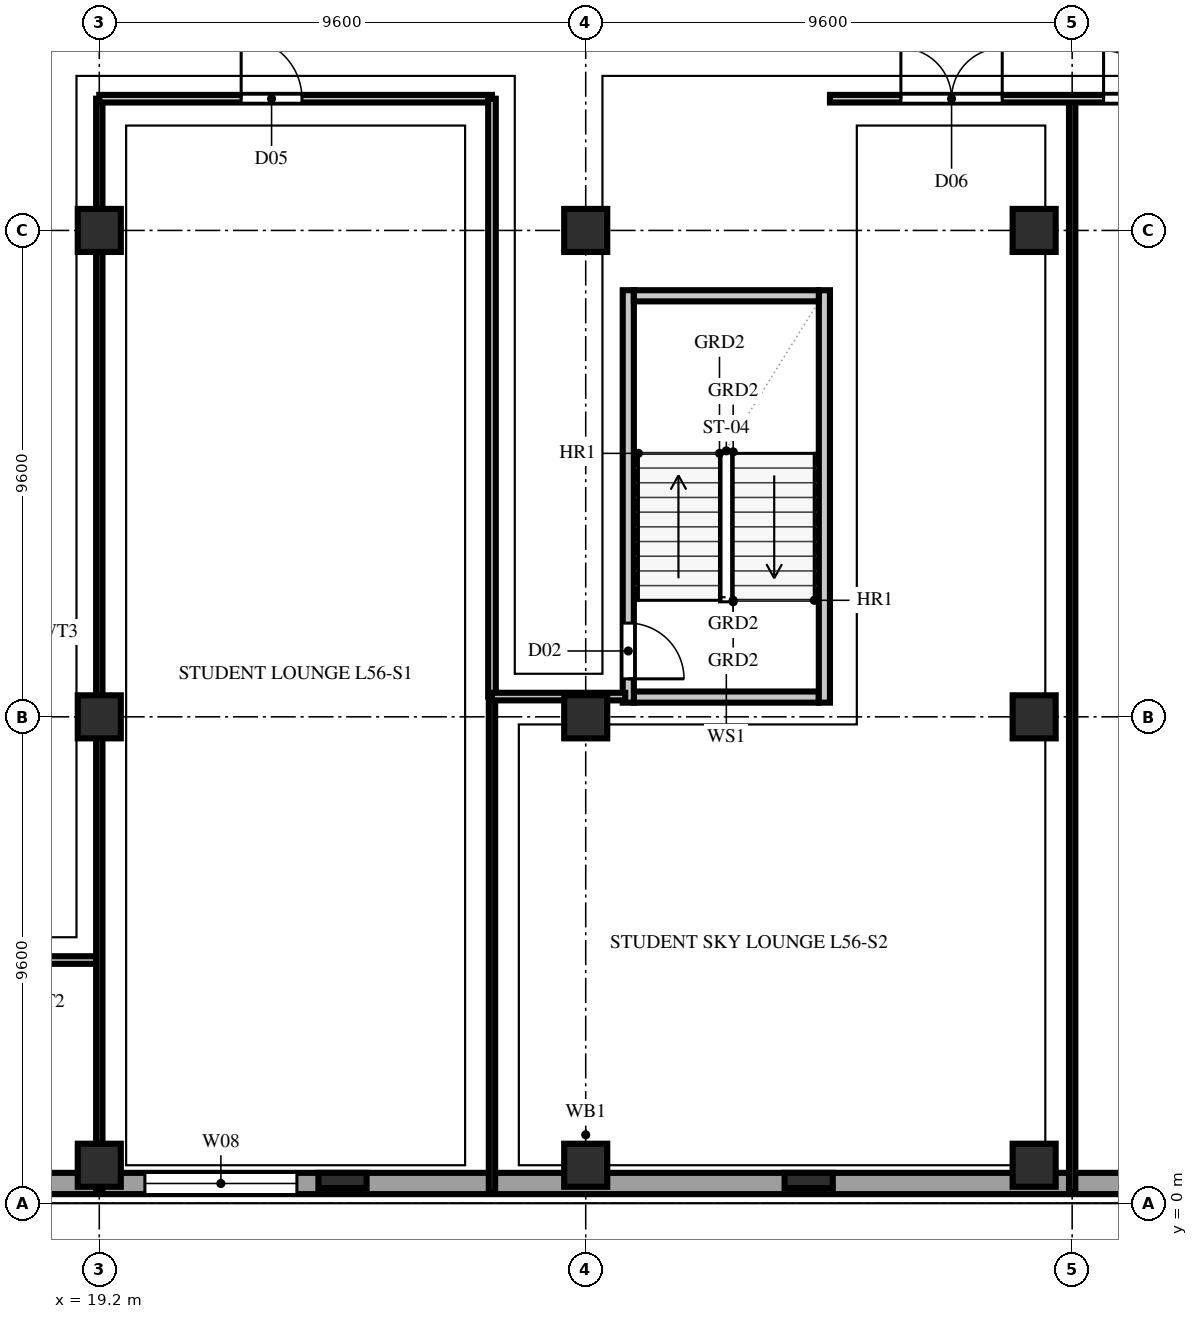
"""IFC4 building model, lengths in metres.
Left out: names, types, materials, properties, quantities, classifications, styles, units other than length and angle.
Written with IfcOpenShell. Run it as: python <this file> out.ifc"""

import sys

from ifc_helpers import new_model, si_unit, direction, frame, frame_2d, origin, origin_2d, place, context, subcontext, project, spatial, rectangle, extrude, element, fill, save


model = new_model("IFC4")
c1 = context("Model", 3, precision=1e-05, world=origin(), true_north=direction((0.0, 1.0)))
c2 = subcontext(c1, "Body", "Model", "MODEL_VIEW")
j1 = project(units=[si_unit("LENGTHUNIT", "METRE"), si_unit("PLANEANGLEUNIT", "RADIAN")], contexts=[c1])
p1 = place(None, origin())
s1 = spatial("IfcSite", under=j1, at=p1, CompositionType="ELEMENT")
p2 = place(p1, origin())
s2 = spatial("IfcBuilding", under=s1, at=p2, CompositionType="ELEMENT")
p3 = place(p2, frame((0.0, 0.0, 221.8)))
s3 = spatial("IfcBuildingStorey", under=s2, at=p3, CompositionType="ELEMENT", Elevation=221.8)
for number, where, z_axis, x_axis in (
    (1, (19.2, 0.75, 0.0), (0.0, 0.0, 1.0), (1.0, 0.0, 0.0)),
    (2, (19.2, 9.6, 0.0), (0.0, 0.0, 1.0), (1.0, 0.0, 0.0)),
    (3, (19.2, 19.2, 0.0), (0.0, 0.0, 1.0), (1.0, 0.0, 0.0)),
    (4, (28.8, 0.75, 0.0), (0.0, 0.0, 1.0), (1.0, 0.0, 0.0)),
    (5, (28.8, 9.6, 0.0), (0.0, 0.0, 1.0), (1.0, 0.0, 0.0)),
    (6, (28.8, 19.2, 0.0), (0.0, 0.0, 1.0), (1.0, 0.0, 0.0)),
    (7, (37.65, 0.75, 0.0), (0.0, 0.0, 1.0), (1.0, 0.0, 0.0)),
    (8, (37.65, 9.6, 0.0), (0.0, 0.0, 1.0), (1.0, 0.0, 0.0)),
    (9, (37.65, 19.2, 0.0), (0.0, 0.0, 1.0), (1.0, 0.0, 0.0)),
):
    element("IfcColumn", number, at=place(p3, frame(where, z_axis=z_axis, x_axis=x_axis)), inside=s3, PredefinedType="COLUMN", context=c2, shape_type="SweptSolid", body=[
        extrude(rectangle(XDim=0.85, YDim=0.85, at=origin_2d()), origin(), (0.0, 0.0, 1.0), 3.8),
    ])
for number, where, z_axis, x_axis in (
    (10, (24.0, 0.45, 0.0), (0.0, 0.0, 1.0), (1.0, 0.0, 0.0)),
    (11, (33.2, 0.45, 0.0), (0.0, 0.0, 1.0), (1.0, 0.0, 0.0)),
):
    element("IfcColumn", number, at=place(p3, frame(where, z_axis=z_axis, x_axis=x_axis)), inside=s3, PredefinedType="PILASTER", context=c2, shape_type="SweptSolid", body=[
        extrude(rectangle(XDim=0.95, YDim=0.3, at=origin_2d()), origin(), (0.0, 0.0, 1.0), 3.8),
    ])
p4 = place(p3, frame((1.84, 0.39, 0.0), z_axis=(0.0, 0.0, 1.0), x_axis=(1.0, 0.0, 0.0)))
e12 = element("IfcWall", 12, at=p4, inside=s3, PredefinedType="SOLIDWALL", context=c2, shape_type="SweptSolid", body=[
    extrude(rectangle(XDim=53.92, YDim=0.42, at=frame_2d((26.96, 0.0))), origin(), (0.0, 0.0, 1.0), 3.54),
])
p5 = place(p4, frame((3.86, 0.0, 0.75)))
e13 = element("IfcOpeningElement", 13, at=p5, cuts=e12, PredefinedType="OPENING", context=c2, shape_type="SweptSolid", body=[
    extrude(rectangle(XDim=3.0, YDim=1.9, at=frame_2d((1.5, 0.95))), frame((0.0, 0.222, 0.0), z_axis=(0.0, -1.0, 0.0), x_axis=(1.0, 0.0, 0.0)), (0.0, 0.0, 1.0), 0.444),
])
p6 = place(p4, frame((8.66, 0.0, 0.75)))
e14 = element("IfcOpeningElement", 14, at=p6, cuts=e12, PredefinedType="OPENING", context=c2, shape_type="SweptSolid", body=[
    extrude(rectangle(XDim=3.0, YDim=1.9, at=frame_2d((1.5, 0.95))), frame((0.0, 0.222, 0.0), z_axis=(0.0, -1.0, 0.0), x_axis=(1.0, 0.0, 0.0)), (0.0, 0.0, 1.0), 0.444),
])
p7 = place(p4, frame((18.26, 0.0, 0.75)))
e15 = element("IfcOpeningElement", 15, at=p7, cuts=e12, PredefinedType="OPENING", context=c2, shape_type="SweptSolid", body=[
    extrude(rectangle(XDim=3.0, YDim=1.9, at=frame_2d((1.5, 0.95))), frame((0.0, 0.222, 0.0), z_axis=(0.0, -1.0, 0.0), x_axis=(1.0, 0.0, 0.0)), (0.0, 0.0, 1.0), 0.444),
])
p8 = place(p3, frame((29.75, 9.99, 0.0), z_axis=(0.0, 0.0, 1.0), x_axis=(1.0, 0.0, 0.0)))
e16 = element("IfcWall", 16, at=p8, inside=s3, PredefinedType="SOLIDWALL", context=c2, shape_type="SweptSolid", body=[
    extrude(rectangle(XDim=3.65, YDim=0.22, at=frame_2d((1.825, 0.0))), origin(), (0.0, 0.0, 1.0), 3.54),
])
p9 = place(p3, frame((29.64, 9.88, 0.0), z_axis=(0.0, 0.0, 1.0), x_axis=(0.0, 1.0, 0.0)))
e17 = element("IfcWall", 17, at=p9, inside=s3, PredefinedType="SOLIDWALL", context=c2, shape_type="SweptSolid", body=[
    extrude(rectangle(XDim=8.14, YDim=0.22, at=frame_2d((4.07, 0.0))), origin(), (0.0, 0.0, 1.0), 3.54),
])
p10 = place(p9, frame((0.47, 0.0, 0.0)))
e18 = element("IfcOpeningElement", 18, at=p10, cuts=e17, PredefinedType="OPENING", context=c2, shape_type="SweptSolid", body=[
    extrude(rectangle(XDim=1.1, YDim=2.2, at=frame_2d((0.55, 1.1))), frame((0.0, 0.122, 0.0), z_axis=(0.0, -1.0, 0.0), x_axis=(1.0, 0.0, 0.0)), (0.0, 0.0, 1.0), 0.244),
])
p11 = place(p3, frame((33.51, 9.88, 0.0), z_axis=(0.0, 0.0, 1.0), x_axis=(0.0, 1.0, 0.0)))
e19 = element("IfcWall", 19, at=p11, inside=s3, PredefinedType="SOLIDWALL", context=c2, shape_type="SweptSolid", body=[
    extrude(rectangle(XDim=8.14, YDim=0.22, at=frame_2d((4.07, 0.0))), origin(), (0.0, 0.0, 1.0), 3.54),
])
p12 = place(p3, frame((29.75, 17.91, 0.0), z_axis=(0.0, 0.0, 1.0), x_axis=(1.0, 0.0, 0.0)))
e20 = element("IfcWall", 20, at=p12, inside=s3, PredefinedType="SOLIDWALL", context=c2, shape_type="SweptSolid", body=[
    extrude(rectangle(XDim=3.65, YDim=0.22, at=frame_2d((1.825, 0.0))), origin(), (0.0, 0.0, 1.0), 3.54),
])
p13 = place(p3, frame((17.05, 4.8, 0.0), z_axis=(0.0, 0.0, 1.0), x_axis=(1.0, 0.0, 0.0)))
e21 = element("IfcWall", 21, at=p13, inside=s3, PredefinedType="PARTITIONING", context=c2, shape_type="SweptSolid", body=[
    extrude(rectangle(XDim=2.15, YDim=0.15, at=frame_2d((1.075, 0.0))), origin(), (0.0, 0.0, 1.0), 3.54),
])
p14 = place(p3, frame((19.2, 0.22, 0.0), z_axis=(0.0, 0.0, 1.0), x_axis=(0.0, 1.0, 0.0)))
e22 = element("IfcWall", 22, at=p14, inside=s3, PredefinedType="PARTITIONING", context=c2, shape_type="SweptSolid", body=[
    extrude(rectangle(XDim=0.53, YDim=0.125, at=frame_2d((0.265, 0.0))), origin(), (0.0, 0.0, 1.0), 3.54),
])
p15 = place(p3, frame((19.2, 0.75, 0.0), z_axis=(0.0, 0.0, 1.0), x_axis=(0.0, 1.0, 0.0)))
e23 = element("IfcWall", 23, at=p15, inside=s3, PredefinedType="PARTITIONING", context=c2, shape_type="SweptSolid", body=[
    extrude(rectangle(XDim=21.05, YDim=0.125, at=frame_2d((10.525, 0.0))), origin(), (0.0, 0.0, 1.0), 2.845),
])
p16 = place(p3, frame((19.2, 21.8, 0.0), z_axis=(0.0, 0.0, 1.0), x_axis=(1.0, 0.0, 0.0)))
e24 = element("IfcWall", 24, at=p16, inside=s3, PredefinedType="PARTITIONING", context=c2, shape_type="SweptSolid", body=[
    extrude(rectangle(XDim=7.75, YDim=0.15, at=frame_2d((3.875, 0.0))), origin(), (0.0, 0.0, 1.0), 3.54),
])
p17 = place(p16, frame((2.8, 0.0, 0.0)))
e25 = element("IfcOpeningElement", 25, at=p17, cuts=e24, PredefinedType="OPENING", context=c2, shape_type="SweptSolid", body=[
    extrude(rectangle(XDim=1.2, YDim=2.2, at=frame_2d((0.6, 1.1))), frame((0.0, 0.087, 0.0), z_axis=(0.0, -1.0, 0.0), x_axis=(1.0, 0.0, 0.0)), (0.0, 0.0, 1.0), 0.174),
])
p18 = place(p3, frame((26.95, 0.22, 0.0), z_axis=(0.0, 0.0, 1.0), x_axis=(0.0, 1.0, 0.0)))
e26 = element("IfcWall", 26, at=p18, inside=s3, PredefinedType="PARTITIONING", context=c2, shape_type="SweptSolid", body=[
    extrude(rectangle(XDim=9.78, YDim=0.125, at=frame_2d((4.89, 0.0))), origin(), (0.0, 0.0, 1.0), 3.54),
])
p19 = place(p3, frame((26.95, 10.0, 0.0), z_axis=(0.0, 0.0, 1.0), x_axis=(0.0, 1.0, 0.0)))
e27 = element("IfcWall", 27, at=p19, inside=s3, PredefinedType="PARTITIONING", context=c2, shape_type="SweptSolid", body=[
    extrude(rectangle(XDim=11.8, YDim=0.15, at=frame_2d((5.9, 0.0))), origin(), (0.0, 0.0, 1.0), 3.54),
])
p20 = place(p3, frame((26.95, 10.0, 0.0), z_axis=(0.0, 0.0, 1.0), x_axis=(1.0, 0.0, 0.0)))
e28 = element("IfcWall", 28, at=p20, inside=s3, PredefinedType="PARTITIONING", context=c2, shape_type="SweptSolid", body=[
    extrude(rectangle(XDim=2.63, YDim=0.15, at=frame_2d((1.315, 0.0))), origin(), (0.0, 0.0, 1.0), 3.54),
])
p21 = place(p3, frame((38.4, 0.22, 0.0), z_axis=(0.0, 0.0, 1.0), x_axis=(0.0, 1.0, 0.0)))
e29 = element("IfcWall", 29, at=p21, inside=s3, PredefinedType="PARTITIONING", context=c2, shape_type="SweptSolid", body=[
    extrude(rectangle(XDim=21.58, YDim=0.125, at=frame_2d((10.79, 0.0))), origin(), (0.0, 0.0, 1.0), 3.54),
])
p22 = place(p3, frame((33.62, 21.8, 0.0), z_axis=(0.0, 0.0, 1.0), x_axis=(1.0, 0.0, 0.0)))
e30 = element("IfcWall", 30, at=p22, inside=s3, PredefinedType="PARTITIONING", context=c2, shape_type="SweptSolid", body=[
    extrude(rectangle(XDim=23.76, YDim=0.15, at=frame_2d((11.88, 0.0))), origin(), (0.0, 0.0, 1.0), 3.54),
])
p23 = place(p22, frame((1.4, 0.0, 0.0)))
e31 = element("IfcOpeningElement", 31, at=p23, cuts=e30, PredefinedType="OPENING", context=c2, shape_type="SweptSolid", body=[
    extrude(rectangle(XDim=2.0, YDim=2.3, at=frame_2d((1.0, 1.15))), frame((0.0, 0.087, 0.0), z_axis=(0.0, -1.0, 0.0), x_axis=(1.0, 0.0, 0.0)), (0.0, 0.0, 1.0), 0.174),
])
p24 = place(p22, frame((5.4, 0.0, 0.0)))
e32 = element("IfcOpeningElement", 32, at=p24, cuts=e30, PredefinedType="OPENING", context=c2, shape_type="SweptSolid", body=[
    extrude(rectangle(XDim=0.95, YDim=2.15, at=frame_2d((0.475, 1.075))), frame((0.0, 0.087, 0.0), z_axis=(0.0, -1.0, 0.0), x_axis=(1.0, 0.0, 0.0)), (0.0, 0.0, 1.0), 0.174),
])
p25 = place(p7, origin())
e33 = element("IfcWindow", 33, at=p25, inside=s3, PartitioningType="TRIPLE_PANEL_VERTICAL", PredefinedType="WINDOW", context=c2, shape_type="SweptSolid", body=[
    extrude(rectangle(XDim=3.0, YDim=1.9, at=frame_2d((1.5, 0.95))), frame((0.0, 0.11, 0.0), z_axis=(0.0, -1.0, 0.0), x_axis=(1.0, 0.0, 0.0)), (0.0, 0.0, 1.0), 0.06),
])
fill(e15, e33)
p26 = place(p10, frame((1.1, 0.0, 0.0), z_axis=(0.0, 0.0, 1.0), x_axis=(-1.0, 0.0, 0.0)))
e34 = element("IfcDoor", 34, at=p26, inside=s3, OperationType="SINGLE_SWING_RIGHT", PredefinedType="DOOR", context=c2, shape_type="SweptSolid", body=[
    extrude(rectangle(XDim=1.1, YDim=2.2, at=frame_2d((0.55, 1.1))), frame((0.0, 0.025, 0.0), z_axis=(0.0, -1.0, 0.0), x_axis=(1.0, 0.0, 0.0)), (0.0, 0.0, 1.0), 0.05),
])
fill(e18, e34)
p27 = place(p17, origin())
e35 = element("IfcDoor", 35, at=p27, inside=s3, OperationType="SINGLE_SWING_LEFT", PredefinedType="DOOR", context=c2, shape_type="SweptSolid", body=[
    extrude(rectangle(XDim=1.2, YDim=2.2, at=frame_2d((0.6, 1.1))), frame((0.0, 0.025, 0.0), z_axis=(0.0, -1.0, 0.0), x_axis=(1.0, 0.0, 0.0)), (0.0, 0.0, 1.0), 0.05),
])
fill(e25, e35)
p28 = place(p23, origin())
e36 = element("IfcDoor", 36, at=p28, inside=s3, OperationType="DOUBLE_SWING_LEFT", PredefinedType="DOOR", context=c2, shape_type="SweptSolid", body=[
    extrude(rectangle(XDim=2.0, YDim=2.3, at=frame_2d((1.0, 1.15))), frame((0.0, 0.025, 0.0), z_axis=(0.0, -1.0, 0.0), x_axis=(1.0, 0.0, 0.0)), (0.0, 0.0, 1.0), 0.05),
])
fill(e31, e36)
p29 = place(p24, origin())
e37 = element("IfcDoor", 37, at=p29, inside=s3, OperationType="SINGLE_SWING_LEFT", PredefinedType="DOOR", context=c2, shape_type="SweptSolid", body=[
    extrude(rectangle(XDim=0.95, YDim=2.15, at=frame_2d((0.475, 1.075))), frame((0.0, 0.025, 0.0), z_axis=(0.0, -1.0, 0.0), x_axis=(1.0, 0.0, 0.0)), (0.0, 0.0, 1.0), 0.05),
])
fill(e32, e37)
save(model, sys.argv[1])
